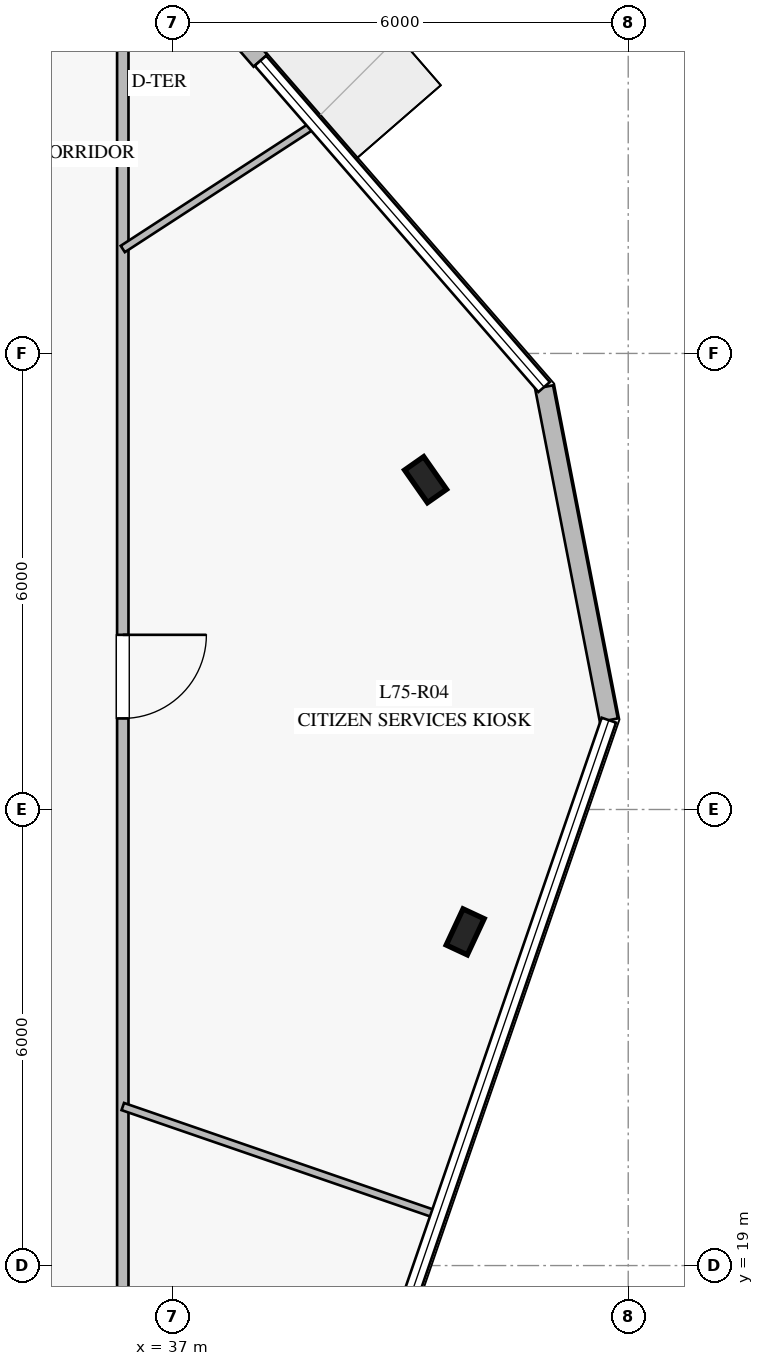
"""IFC4 building model, lengths in metres.
Left out: names, types, materials, properties, quantities, classifications, styles, units other than length and angle.
Written with IfcOpenShell. Run it as: python <this file> out.ifc"""

import sys

from ifc_helpers import new_model, si_unit, direction, frame, frame_2d, origin, origin_2d, place, context, subcontext, project, spatial, rectangle, i_section, extrude, element, fill, save


model = new_model("IFC4")
c1 = context("Model", 3, precision=1e-05, world=origin(), true_north=direction((0.0, 1.0)))
c2 = subcontext(c1, "Body", "Model", "MODEL_VIEW")
j1 = project(units=[si_unit("LENGTHUNIT", "METRE"), si_unit("PLANEANGLEUNIT", "RADIAN")], contexts=[c1])
p1 = place(None, origin())
s1 = spatial("IfcSite", under=j1, at=p1, CompositionType="ELEMENT")
p2 = place(p1, origin())
s2 = spatial("IfcBuilding", under=s1, at=p2, CompositionType="ELEMENT")
p3 = place(p2, frame((0.0, 0.0, 310.2)))
s3 = spatial("IfcBuildingStorey", under=s2, at=p3, CompositionType="ELEMENT", Elevation=310.2)
for number, where, z_axis, x_axis in (
    (1, (40.855, 23.39, 0.0), (0.0, 0.0, 1.0), (0.423, 0.906, 0.0)),
    (2, (40.334, 29.339, 0.0), (0.0, 0.0, 1.0), (-0.574, 0.819, 0.0)),
):
    element("IfcColumn", number, at=place(p3, frame(where, z_axis=z_axis, x_axis=x_axis)), inside=s3, PredefinedType="COLUMN", context=c2, shape_type="SweptSolid", body=[
        extrude(i_section(OverallWidth=0.306, OverallDepth=0.524, WebThickness=0.021, FlangeThickness=0.04, at=origin_2d()), origin(), (0.0, 0.0, 1.0), 4.0),
    ])
p4 = place(p3, frame((42.745, 26.175, 0.0), z_axis=(0.0, 0.0, 1.0), x_axis=(-0.190824290845, 0.981624210186, 0.0)))
e3 = element("IfcWall", 3, at=p4, inside=s3, PredefinedType="STANDARD", context=c2, shape_type="SweptSolid", body=[
    extrude(rectangle(XDim=4.465, YDim=0.24, at=frame_2d((2.232, 0.0))), origin(), (0.0, 0.0, 1.0), 3.78),
])
p5 = place(p3, frame((38.161, 34.851, 0.0), z_axis=(0.0, 0.0, 1.0), x_axis=(-0.655979683466, 0.754778546913, 0.0)))
e4 = element("IfcWall", 4, at=p5, inside=s3, PredefinedType="STANDARD", context=c2, shape_type="SweptSolid", body=[
    extrude(rectangle(XDim=2.399, YDim=0.24, at=frame_2d((1.2, 0.0))), origin(), (0.0, 0.0, 1.0), 3.78),
])
p6 = place(p5, frame((0.4, 0.0, 0.0)))
e5 = element("IfcOpeningElement", 5, at=p6, cuts=e4, PredefinedType="OPENING", context=c2, shape_type="SweptSolid", body=[
    extrude(rectangle(XDim=1.6, YDim=2.25, at=frame_2d((0.8, 1.125))), frame((0.0, 0.13, 0.0), z_axis=(0.0, -1.0, 0.0), x_axis=(1.0, 0.0, 0.0)), (0.0, 0.0, 1.0), 0.26),
])
p7 = place(p3, frame((36.35, 35.75, 0.0), z_axis=(0.0, 0.0, 1.0), x_axis=(0.0, -1.0, 0.0)))
e6 = element("IfcWall", 6, at=p7, inside=s3, PredefinedType="PARTITIONING", context=c2, shape_type="SweptSolid", body=[
    extrude(rectangle(XDim=21.5, YDim=0.15, at=frame_2d((10.75, 0.0))), origin(), (0.0, 0.0, 1.0), 3.28),
])
p8 = place(p7, frame((17.271, 0.0, 0.0)))
e7 = element("IfcOpeningElement", 7, at=p8, cuts=e6, PredefinedType="OPENING", context=c2, shape_type="SweptSolid", body=[
    extrude(rectangle(XDim=1.1, YDim=2.2, at=frame_2d((0.55, 1.1))), frame((0.0, 0.085, 0.0), z_axis=(0.0, -1.0, 0.0), x_axis=(1.0, 0.0, 0.0)), (0.0, 0.0, 1.0), 0.17),
])
p9 = place(p7, frame((8.452, 0.0, 0.0)))
e8 = element("IfcOpeningElement", 8, at=p9, cuts=e6, PredefinedType="OPENING", context=c2, shape_type="SweptSolid", body=[
    extrude(rectangle(XDim=1.1, YDim=2.2, at=frame_2d((0.55, 1.1))), frame((0.0, 0.085, 0.0), z_axis=(0.0, -1.0, 0.0), x_axis=(1.0, 0.0, 0.0)), (0.0, 0.0, 1.0), 0.17),
])
p10 = place(p3, frame((36.35, 21.092, 0.0), z_axis=(0.0, 0.0, 1.0), x_axis=(0.94547788529, -0.325686303714, 0.0)))
e9 = element("IfcWall", 9, at=p10, inside=s3, PredefinedType="MOVABLE", context=c2, shape_type="SweptSolid", body=[
    extrude(rectangle(XDim=4.375, YDim=0.1, at=frame_2d((2.188, 0.0))), origin(), (0.0, 0.0, 1.0), 3.28),
])
p11 = place(p3, frame((36.35, 32.374, 0.0), z_axis=(0.0, 0.0, 1.0), x_axis=(0.838454751328, 0.544971219401, 0.0)))
e10 = element("IfcWall", 10, at=p11, inside=s3, PredefinedType="MOVABLE", context=c2, shape_type="SweptSolid", body=[
    extrude(rectangle(XDim=3.006, YDim=0.1, at=frame_2d((1.503, 0.0))), origin(), (0.0, 0.0, 1.0), 3.28),
])
p12 = place(p9, origin())
e11 = element("IfcDoor", 11, at=p12, inside=s3, OperationType="SINGLE_SWING_LEFT", PredefinedType="DOOR", context=c2, shape_type="SweptSolid", body=[
    extrude(rectangle(XDim=1.1, YDim=2.2, at=frame_2d((0.55, 1.1))), frame((0.0, 0.025, 0.0), z_axis=(0.0, -1.0, 0.0), x_axis=(1.0, 0.0, 0.0)), (0.0, 0.0, 1.0), 0.05),
])
fill(e8, e11)
save(model, sys.argv[1])
